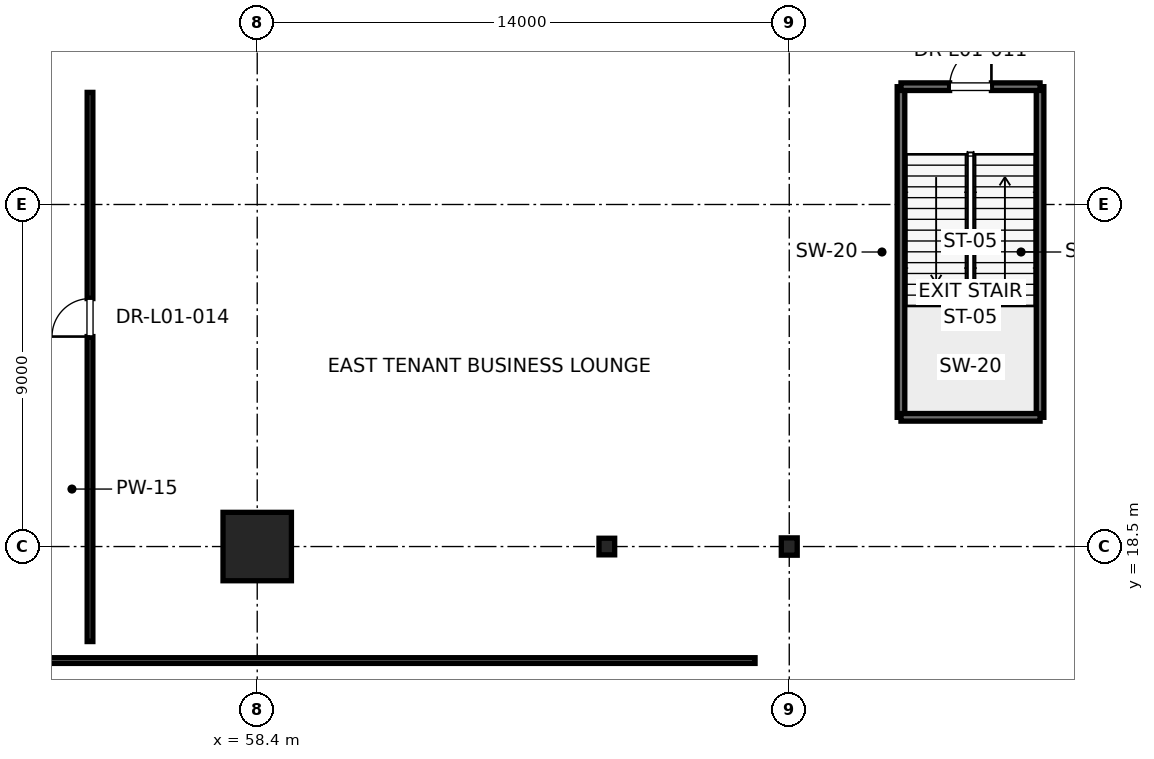
"""IFC4 building model, lengths in metres.
Left out: names, types, materials, properties, quantities, classifications, styles, units other than length and angle.
Written with IfcOpenShell. Run it as: python <this file> out.ifc"""

import sys

from ifc_helpers import new_model, si_unit, direction, frame, frame_2d, origin, origin_2d, place, context, subcontext, project, spatial, rectangle, i_section, extrude, element, fill, save


model = new_model("IFC4")
c1 = context("Model", 3, precision=1e-05, world=origin(), true_north=direction((0.0, 1.0)))
c2 = subcontext(c1, "Body", "Model", "MODEL_VIEW")
j1 = project(units=[si_unit("LENGTHUNIT", "METRE"), si_unit("PLANEANGLEUNIT", "RADIAN")], contexts=[c1])
p1 = place(None, origin())
s1 = spatial("IfcSite", under=j1, at=p1, CompositionType="ELEMENT")
p2 = place(p1, origin())
s2 = spatial("IfcBuilding", under=s1, at=p2, CompositionType="ELEMENT")
p3 = place(p2, frame((0.0, 0.0, 6.0)))
s3 = spatial("IfcBuildingStorey", under=s2, at=p3, CompositionType="ELEMENT", Elevation=6.0)
p4 = place(p3, frame((58.4, 18.5, 0.0), z_axis=(0.0, 0.0, 1.0), x_axis=(1.0, 0.0, 0.0)))
e1 = element("IfcColumn", 1, at=p4, inside=s3, PredefinedType="COLUMN", context=c2, shape_type="SweptSolid", body=[
    extrude(rectangle(XDim=1.8, YDim=1.8, at=origin_2d()), origin(), (0.0, 0.0, 1.0), 5.2),
])
p5 = place(p3, frame((67.6, 18.5, 0.0), z_axis=(0.0, 0.0, 1.0), x_axis=(1.0, 0.0, 0.0)))
e2 = element("IfcColumn", 2, at=p5, inside=s3, PredefinedType="COLUMN", context=c2, shape_type="SweptSolid", body=[
    extrude(i_section(OverallWidth=0.412, OverallDepth=0.437, WebThickness=0.036, FlangeThickness=0.058, FilletRadius=0.015, at=origin_2d()), origin(), (0.0, 0.0, 1.0), 5.2),
])
p6 = place(p3, frame((72.4, 18.5, 0.0), z_axis=(0.0, 0.0, 1.0), x_axis=(1.0, 0.0, 0.0)))
e3 = element("IfcColumn", 3, at=p6, inside=s3, PredefinedType="COLUMN", context=c2, shape_type="SweptSolid", body=[
    extrude(i_section(OverallWidth=0.418, OverallDepth=0.456, WebThickness=0.042, FlangeThickness=0.067, FilletRadius=0.015, at=origin_2d()), origin(), (0.0, 0.0, 1.0), 5.2),
])
for number, where, z_axis, x_axis in (
    (4, (75.34, 21.9, 0.0), (0.0, 0.0, 1.0), (0.0, 1.0, 0.0)),
    (5, (79.0, 21.9, 0.0), (0.0, 0.0, 1.0), (0.0, 1.0, 0.0)),
):
    element("IfcWall", number, at=place(p3, frame(where, z_axis=z_axis, x_axis=x_axis)), inside=s3, PredefinedType="SOLIDWALL", context=c2, shape_type="SweptSolid", body=[
        extrude(rectangle(XDim=8.7, YDim=0.2, at=frame_2d((4.35, 0.0))), origin(), (0.0, 0.0, 1.0), 4.92),
    ])
p7 = place(p3, frame((75.34, 30.6, 0.0), z_axis=(0.0, 0.0, 1.0), x_axis=(1.0, 0.0, 0.0)))
e6 = element("IfcWall", 6, at=p7, inside=s3, PredefinedType="SOLIDWALL", context=c2, shape_type="SweptSolid", body=[
    extrude(rectangle(XDim=3.66, YDim=0.2, at=frame_2d((1.83, 0.0))), origin(), (0.0, 0.0, 1.0), 4.92),
])
p8 = place(p7, frame((1.28, 0.0, 0.0)))
e7 = element("IfcOpeningElement", 7, at=p8, cuts=e6, PredefinedType="OPENING", context=c2, shape_type="SweptSolid", body=[
    extrude(rectangle(XDim=1.1, YDim=2.15, at=frame_2d((0.55, 1.075))), frame((0.0, 0.1, 0.0), z_axis=(0.0, -1.0, 0.0), x_axis=(1.0, 0.0, 0.0)), (0.0, 0.0, 1.0), 0.2),
])
p9 = place(p3, frame((75.34, 21.9, 0.0), z_axis=(0.0, 0.0, 1.0), x_axis=(1.0, 0.0, 0.0)))
e8 = element("IfcWall", 8, at=p9, inside=s3, PredefinedType="SOLIDWALL", context=c2, shape_type="SweptSolid", body=[
    extrude(rectangle(XDim=3.66, YDim=0.2, at=frame_2d((1.83, 0.0))), origin(), (0.0, 0.0, 1.0), 4.92),
])
p10 = place(p3, frame((9.5, 15.5, 0.0), z_axis=(0.0, 0.0, 1.0), x_axis=(1.0, 0.0, 0.0)))
e9 = element("IfcWall", 9, at=p10, inside=s3, PredefinedType="PARTITIONING", context=c2, shape_type="SweptSolid", body=[
    extrude(rectangle(XDim=62.0, YDim=0.15, at=frame_2d((31.0, 0.0))), origin(), (0.0, 0.0, 1.0), 2.85),
])
p11 = place(p10, frame((30.5, 0.0, 0.0)))
e10 = element("IfcOpeningElement", 10, at=p11, cuts=e9, PredefinedType="OPENING", context=c2, shape_type="SweptSolid", body=[
    extrude(rectangle(XDim=1.0, YDim=2.15, at=frame_2d((0.5, 1.075))), frame((0.0, 0.075, 0.0), z_axis=(0.0, -1.0, 0.0), x_axis=(1.0, 0.0, 0.0)), (0.0, 0.0, 1.0), 0.15),
])
p12 = place(p3, frame((54.0, 16.0, 0.0), z_axis=(0.0, 0.0, 1.0), x_axis=(0.0, 1.0, 0.0)))
e11 = element("IfcWall", 11, at=p12, inside=s3, PredefinedType="PARTITIONING", context=c2, shape_type="SweptSolid", body=[
    extrude(rectangle(XDim=14.45, YDim=0.15, at=frame_2d((7.225, 0.0))), origin(), (0.0, 0.0, 1.0), 2.85),
])
p13 = place(p12, frame((8.025, 0.0, 0.0)))
e12 = element("IfcOpeningElement", 12, at=p13, cuts=e11, PredefinedType="OPENING", context=c2, shape_type="SweptSolid", body=[
    extrude(rectangle(XDim=1.0, YDim=2.15, at=frame_2d((0.5, 1.075))), frame((0.0, 0.075, 0.0), z_axis=(0.0, -1.0, 0.0), x_axis=(1.0, 0.0, 0.0)), (0.0, 0.0, 1.0), 0.15),
])
p14 = place(p8, origin())
e13 = element("IfcDoor", 13, at=p14, inside=s3, OperationType="SINGLE_SWING_RIGHT", PredefinedType="DOOR", context=c2, shape_type="SweptSolid", body=[
    extrude(rectangle(XDim=1.1, YDim=2.15, at=frame_2d((0.55, 1.075))), frame((0.0, 0.025, 0.0), z_axis=(0.0, -1.0, 0.0), x_axis=(1.0, 0.0, 0.0)), (0.0, 0.0, 1.0), 0.05),
])
fill(e7, e13)
p15 = place(p13, origin())
e14 = element("IfcDoor", 14, at=p15, inside=s3, OperationType="SINGLE_SWING_LEFT", PredefinedType="DOOR", context=c2, shape_type="SweptSolid", body=[
    extrude(rectangle(XDim=1.0, YDim=2.15, at=frame_2d((0.5, 1.075))), frame((0.0, 0.025, 0.0), z_axis=(0.0, -1.0, 0.0), x_axis=(1.0, 0.0, 0.0)), (0.0, 0.0, 1.0), 0.05),
])
fill(e12, e14)
save(model, sys.argv[1])
